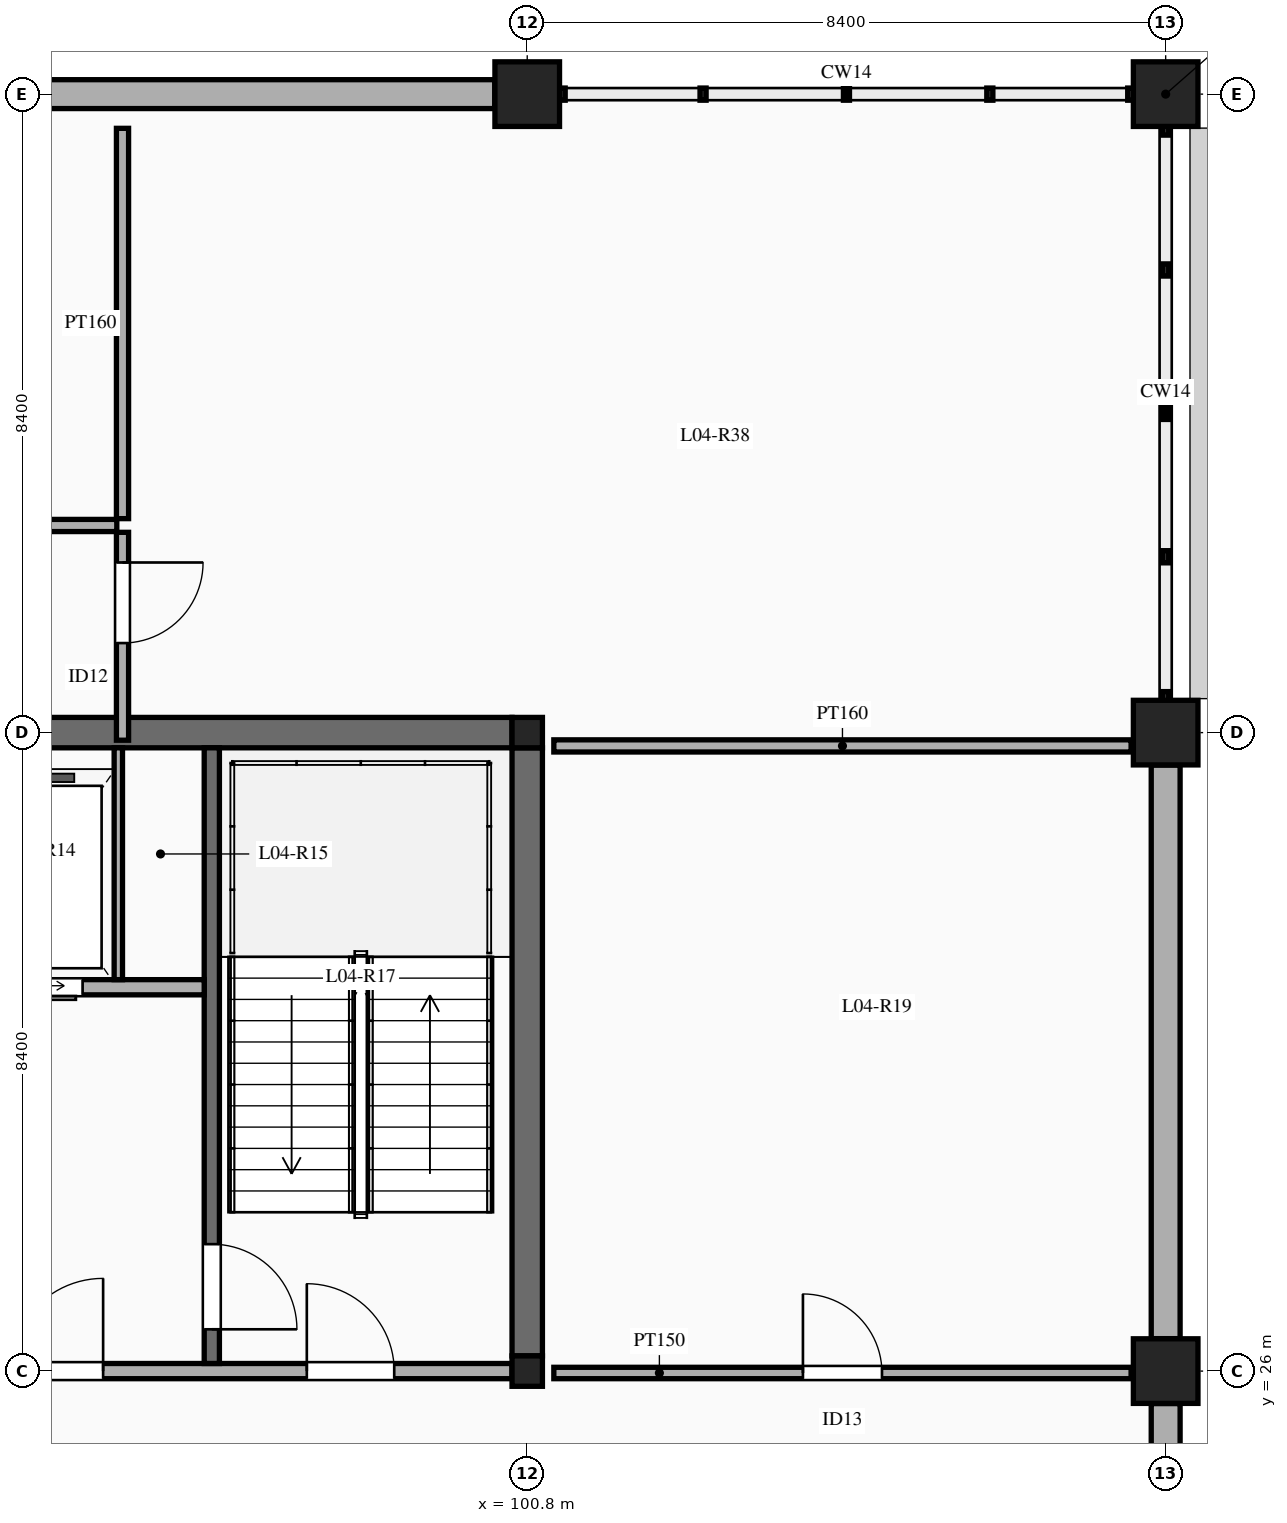
"""IFC4 building model, lengths in metres.
Left out: names, types, materials, properties, quantities, classifications, styles, units other than length and angle.
Written with IfcOpenShell. Run it as: python <this file> out.ifc"""

import sys

from ifc_helpers import new_model, si_unit, direction, frame, frame_2d, origin, origin_2d, place, context, subcontext, project, spatial, rectangle, extrude, element, fill, save


model = new_model("IFC4")
c1 = context("Model", 3, precision=1e-05, world=origin(), true_north=direction((0.0, 1.0)))
c2 = subcontext(c1, "Body", "Model", "MODEL_VIEW")
j1 = project(units=[si_unit("LENGTHUNIT", "METRE"), si_unit("PLANEANGLEUNIT", "RADIAN")], contexts=[c1])
p1 = place(None, origin())
s1 = spatial("IfcSite", under=j1, at=p1, CompositionType="ELEMENT")
p2 = place(p1, origin())
s2 = spatial("IfcBuilding", under=s1, at=p2, CompositionType="ELEMENT")
p3 = place(p2, frame((0.0, 0.0, 19.5)))
s3 = spatial("IfcBuildingStorey", under=s2, at=p3, CompositionType="ELEMENT", Elevation=19.5)
for number, where, z_axis, x_axis in (
    (1, (100.8, 26.0, 0.0), (0.0, 0.0, 1.0), (1.0, 0.0, 0.0)),
    (2, (100.8, 34.4, 0.0), (0.0, 0.0, 1.0), (1.0, 0.0, 0.0)),
):
    element("IfcColumn", number, at=place(p3, frame(where, z_axis=z_axis, x_axis=x_axis)), inside=s3, PredefinedType="COLUMN", context=c2, shape_type="SweptSolid", body=[
        extrude(rectangle(XDim=0.4, YDim=0.4, at=origin_2d()), origin(), (0.0, 0.0, 1.0), 4.5),
    ])
for number, where, z_axis, x_axis in (
    (3, (100.8, 42.8, 0.0), (0.0, 0.0, 1.0), (1.0, 0.0, 0.0)),
    (4, (109.2, 26.0, 0.0), (0.0, 0.0, 1.0), (1.0, 0.0, 0.0)),
    (5, (109.2, 34.4, 0.0), (0.0, 0.0, 1.0), (1.0, 0.0, 0.0)),
    (6, (109.2, 42.8, 0.0), (0.0, 0.0, 1.0), (1.0, 0.0, 0.0)),
):
    element("IfcColumn", number, at=place(p3, frame(where, z_axis=z_axis, x_axis=x_axis)), inside=s3, PredefinedType="COLUMN", context=c2, shape_type="SweptSolid", body=[
        extrude(rectangle(XDim=0.85, YDim=0.85, at=origin_2d()), origin(), (0.0, 0.0, 1.0), 4.5),
    ])
for number, where, z_axis, x_axis in (
    (7, (100.8, 26.2, 0.0), (0.0, 0.0, 1.0), (0.0, 1.0, 0.0)),
    (8, (92.6, 34.4, 0.0), (0.0, 0.0, 1.0), (1.0, 0.0, 0.0)),
):
    element("IfcWall", number, at=place(p3, frame(where, z_axis=z_axis, x_axis=x_axis)), inside=s3, PredefinedType="SHEAR", context=c2, shape_type="SweptSolid", body=[
        extrude(rectangle(XDim=8.0, YDim=0.4, at=frame_2d((4.0, 0.0))), origin(), (0.0, 0.0, 1.0), 4.5),
    ])
p4 = place(p3, frame((92.827, 42.8, 0.0), z_axis=(0.0, 0.0, 1.0), x_axis=(1.0, 0.0, 0.0)))
e9 = element("IfcWall", 9, at=p4, inside=s3, PredefinedType="SOLIDWALL", context=c2, shape_type="SweptSolid", body=[
    extrude(rectangle(XDim=7.546, YDim=0.38, at=frame_2d((3.773, 0.0))), origin(), (0.0, 0.0, 1.0), 3.55),
])
for number, where, z_axis, x_axis in (
    (10, (109.2, 18.027, 0.0), (0.0, 0.0, 1.0), (0.0, 1.0, 0.0)),
    (11, (109.2, 26.427, 0.0), (0.0, 0.0, 1.0), (0.0, 1.0, 0.0)),
):
    element("IfcWall", number, at=place(p3, frame(where, z_axis=z_axis, x_axis=x_axis)), inside=s3, PredefinedType="SOLIDWALL", context=c2, shape_type="SweptSolid", body=[
        extrude(rectangle(XDim=7.546, YDim=0.38, at=frame_2d((3.773, 0.0))), origin(), (0.0, 0.0, 1.0), 3.55),
    ])
p5 = place(p3, frame((92.6, 26.0, 0.0), z_axis=(0.0, 0.0, 1.0), x_axis=(1.0, 0.0, 0.0)))
e12 = element("IfcWall", 12, at=p5, inside=s3, PredefinedType="SOLIDWALL", context=c2, shape_type="SweptSolid", body=[
    extrude(rectangle(XDim=8.0, YDim=0.2, at=frame_2d((4.0, 0.0))), origin(), (0.0, 0.0, 1.0), 3.53),
])
p6 = place(p5, frame((1.4, 0.0, 0.0)))
e13 = element("IfcOpeningElement", 13, at=p6, cuts=e12, PredefinedType="OPENING", context=c2, shape_type="SweptSolid", body=[
    extrude(rectangle(XDim=1.22, YDim=2.15, at=frame_2d((0.61, 1.075))), frame((0.0, 0.11, 0.0), z_axis=(0.0, -1.0, 0.0), x_axis=(1.0, 0.0, 0.0)), (0.0, 0.0, 1.0), 0.22),
])
p7 = place(p5, frame((5.3, 0.0, 0.0)))
e14 = element("IfcOpeningElement", 14, at=p7, cuts=e12, PredefinedType="OPENING", context=c2, shape_type="SweptSolid", body=[
    extrude(rectangle(XDim=1.15, YDim=2.15, at=frame_2d((0.575, 1.075))), frame((0.0, 0.11, 0.0), z_axis=(0.0, -1.0, 0.0), x_axis=(1.0, 0.0, 0.0)), (0.0, 0.0, 1.0), 0.22),
])
p8 = place(p3, frame((96.65, 26.1, 0.0), z_axis=(0.0, 0.0, 1.0), x_axis=(0.0, 1.0, 0.0)))
e15 = element("IfcWall", 15, at=p8, inside=s3, PredefinedType="SOLIDWALL", context=c2, shape_type="SweptSolid", body=[
    extrude(rectangle(XDim=8.1, YDim=0.2, at=frame_2d((4.05, 0.0))), origin(), (0.0, 0.0, 1.0), 4.25),
])
p9 = place(p8, frame((0.45, 0.0, 0.0)))
e16 = element("IfcOpeningElement", 16, at=p9, cuts=e15, PredefinedType="OPENING", context=c2, shape_type="SweptSolid", body=[
    extrude(rectangle(XDim=1.12, YDim=2.15, at=frame_2d((0.56, 1.075))), frame((0.0, 0.11, 0.0), z_axis=(0.0, -1.0, 0.0), x_axis=(1.0, 0.0, 0.0)), (0.0, 0.0, 1.0), 0.22),
])
p10 = place(p3, frame((92.6, 31.05, 0.0), z_axis=(0.0, 0.0, 1.0), x_axis=(1.0, 0.0, 0.0)))
e17 = element("IfcWall", 17, at=p10, inside=s3, PredefinedType="SOLIDWALL", context=c2, shape_type="SweptSolid", body=[
    extrude(rectangle(XDim=3.95, YDim=0.2, at=frame_2d((1.975, 0.0))), origin(), (0.0, 0.0, 1.0), 4.25),
])
p11 = place(p10, frame((1.25, 0.0, 0.0)))
e18 = element("IfcOpeningElement", 18, at=p11, cuts=e17, PredefinedType="OPENING", context=c2, shape_type="SweptSolid", body=[
    extrude(rectangle(XDim=1.1, YDim=2.15, at=frame_2d((0.55, 1.075))), frame((0.0, 0.11, 0.0), z_axis=(0.0, -1.0, 0.0), x_axis=(1.0, 0.0, 0.0)), (0.0, 0.0, 1.0), 0.22),
])
p12 = place(p3, frame((95.42, 31.15, 0.0), z_axis=(0.0, 0.0, 1.0), x_axis=(0.0, 1.0, 0.0)))
e19 = element("IfcWall", 19, at=p12, inside=s3, PredefinedType="PARTITIONING", context=c2, shape_type="SweptSolid", body=[
    extrude(rectangle(XDim=3.05, YDim=0.11, at=frame_2d((1.525, 0.0))), origin(), (0.0, 0.0, 1.0), 4.25),
])
p13 = place(p3, frame((101.15, 25.975, 0.0), z_axis=(0.0, 0.0, 1.0), x_axis=(1.0, 0.0, 0.0)))
e20 = element("IfcWall", 20, at=p13, inside=s3, PredefinedType="PARTITIONING", context=c2, shape_type="SweptSolid", body=[
    extrude(rectangle(XDim=7.595, YDim=0.15, at=frame_2d((3.798, 0.0))), origin(), (0.0, 0.0, 1.0), 3.45),
])
p14 = place(p13, frame((3.278, 0.0, 0.0)))
e21 = element("IfcOpeningElement", 21, at=p14, cuts=e20, PredefinedType="OPENING", context=c2, shape_type="SweptSolid", body=[
    extrude(rectangle(XDim=1.04, YDim=2.15, at=frame_2d((0.52, 1.075))), frame((0.0, 0.085, 0.0), z_axis=(0.0, -1.0, 0.0), x_axis=(1.0, 0.0, 0.0)), (0.0, 0.0, 1.0), 0.17),
])
p15 = place(p3, frame((101.15, 34.225, 0.0), z_axis=(0.0, 0.0, 1.0), x_axis=(1.0, 0.0, 0.0)))
e22 = element("IfcWall", 22, at=p15, inside=s3, PredefinedType="PARTITIONING", context=c2, shape_type="SweptSolid", body=[
    extrude(rectangle(XDim=7.595, YDim=0.16, at=frame_2d((3.798, 0.0))), origin(), (0.0, 0.0, 1.0), 3.45),
])
p16 = place(p3, frame((79.75, 37.125, 0.0), z_axis=(0.0, 0.0, 1.0), x_axis=(1.0, 0.0, 0.0)))
e23 = element("IfcWall", 23, at=p16, inside=s3, PredefinedType="PARTITIONING", context=c2, shape_type="SweptSolid", body=[
    extrude(rectangle(XDim=15.65, YDim=0.16, at=frame_2d((7.825, 0.0))), origin(), (0.0, 0.0, 1.0), 3.45),
])
p17 = place(p16, frame((7.18, 0.0, 0.0)))
e24 = element("IfcOpeningElement", 24, at=p17, cuts=e23, PredefinedType="OPENING", context=c2, shape_type="SweptSolid", body=[
    extrude(rectangle(XDim=1.14, YDim=2.22, at=frame_2d((0.57, 1.11))), frame((0.0, 0.09, 0.0), z_axis=(0.0, -1.0, 0.0), x_axis=(1.0, 0.0, 0.0)), (0.0, 0.0, 1.0), 0.18),
])
p18 = place(p3, frame((95.475, 34.3, 0.0), z_axis=(0.0, 0.0, 1.0), x_axis=(0.0, 1.0, 0.0)))
e25 = element("IfcWall", 25, at=p18, inside=s3, PredefinedType="PARTITIONING", context=c2, shape_type="SweptSolid", body=[
    extrude(rectangle(XDim=2.735, YDim=0.16, at=frame_2d((1.367, 0.0))), origin(), (0.0, 0.0, 1.0), 3.45),
])
p19 = place(p18, frame((1.278, 0.0, 0.0)))
e26 = element("IfcOpeningElement", 26, at=p19, cuts=e25, PredefinedType="OPENING", context=c2, shape_type="SweptSolid", body=[
    extrude(rectangle(XDim=1.06, YDim=2.18, at=frame_2d((0.53, 1.09))), frame((0.0, 0.09, 0.0), z_axis=(0.0, -1.0, 0.0), x_axis=(1.0, 0.0, 0.0)), (0.0, 0.0, 1.0), 0.18),
])
p20 = place(p3, frame((95.475, 37.215, 0.0), z_axis=(0.0, 0.0, 1.0), x_axis=(0.0, 1.0, 0.0)))
e27 = element("IfcWall", 27, at=p20, inside=s3, PredefinedType="PARTITIONING", context=c2, shape_type="SweptSolid", body=[
    extrude(rectangle(XDim=5.135, YDim=0.16, at=frame_2d((2.567, 0.0))), origin(), (0.0, 0.0, 1.0), 3.45),
])
p21 = place(p6, origin())
e28 = element("IfcDoor", 28, at=p21, inside=s3, OperationType="SINGLE_SWING_RIGHT", PredefinedType="DOOR", context=c2, shape_type="SweptSolid", body=[
    extrude(rectangle(XDim=1.22, YDim=2.15, at=frame_2d((0.61, 1.075))), frame((0.0, 0.025, 0.0), z_axis=(0.0, -1.0, 0.0), x_axis=(1.0, 0.0, 0.0)), (0.0, 0.0, 1.0), 0.05),
])
fill(e13, e28)
p22 = place(p7, origin())
e29 = element("IfcDoor", 29, at=p22, inside=s3, OperationType="SINGLE_SWING_LEFT", PredefinedType="DOOR", context=c2, shape_type="SweptSolid", body=[
    extrude(rectangle(XDim=1.15, YDim=2.15, at=frame_2d((0.575, 1.075))), frame((0.0, 0.025, 0.0), z_axis=(0.0, -1.0, 0.0), x_axis=(1.0, 0.0, 0.0)), (0.0, 0.0, 1.0), 0.05),
])
fill(e14, e29)
p23 = place(p9, frame((1.12, 0.0, 0.0), z_axis=(0.0, 0.0, 1.0), x_axis=(-1.0, 0.0, 0.0)))
e30 = element("IfcDoor", 30, at=p23, inside=s3, OperationType="SINGLE_SWING_RIGHT", PredefinedType="DOOR", context=c2, shape_type="SweptSolid", body=[
    extrude(rectangle(XDim=1.12, YDim=2.15, at=frame_2d((0.56, 1.075))), frame((0.0, 0.025, 0.0), z_axis=(0.0, -1.0, 0.0), x_axis=(1.0, 0.0, 0.0)), (0.0, 0.0, 1.0), 0.05),
])
fill(e16, e30)
p24 = place(p11, frame((1.1, 0.0, 0.0), z_axis=(0.0, 0.0, 1.0), x_axis=(-1.0, 0.0, 0.0)))
e31 = element("IfcDoor", 31, at=p24, inside=s3, OperationType="SLIDING_TO_LEFT", PredefinedType="DOOR", context=c2, shape_type="SweptSolid", body=[
    extrude(rectangle(XDim=1.1, YDim=2.15, at=frame_2d((0.55, 1.075))), frame((0.0, 0.025, 0.0), z_axis=(0.0, -1.0, 0.0), x_axis=(1.0, 0.0, 0.0)), (0.0, 0.0, 1.0), 0.05),
])
fill(e18, e31)
p25 = place(p14, origin())
e32 = element("IfcDoor", 32, at=p25, inside=s3, OperationType="SINGLE_SWING_LEFT", PredefinedType="DOOR", context=c2, shape_type="SweptSolid", body=[
    extrude(rectangle(XDim=1.04, YDim=2.15, at=frame_2d((0.52, 1.075))), frame((0.0, 0.025, 0.0), z_axis=(0.0, -1.0, 0.0), x_axis=(1.0, 0.0, 0.0)), (0.0, 0.0, 1.0), 0.05),
])
fill(e21, e32)
p26 = place(p19, frame((1.06, 0.0, 0.0), z_axis=(0.0, 0.0, 1.0), x_axis=(-1.0, 0.0, 0.0)))
e33 = element("IfcDoor", 33, at=p26, inside=s3, OperationType="SINGLE_SWING_LEFT", PredefinedType="DOOR", context=c2, shape_type="SweptSolid", body=[
    extrude(rectangle(XDim=1.06, YDim=2.18, at=frame_2d((0.53, 1.09))), frame((0.0, 0.025, 0.0), z_axis=(0.0, -1.0, 0.0), x_axis=(1.0, 0.0, 0.0)), (0.0, 0.0, 1.0), 0.05),
])
fill(e26, e33)
save(model, sys.argv[1])
